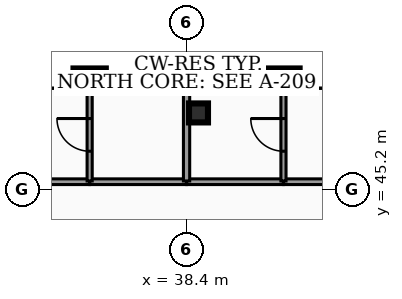
"""IFC4 building model, lengths in metres.
Left out: names, types, materials, properties, quantities, classifications, styles, units other than length and angle.
Written with IfcOpenShell. Run it as: python <this file> out.ifc"""

import sys

from ifc_helpers import new_model, si_unit, direction, frame, frame_2d, origin, origin_2d, place, context, subcontext, project, spatial, rectangle, hollow_rectangle, extrude, element, fill, save


model = new_model("IFC4")
c1 = context("Model", 3, precision=1e-05, world=origin(), true_north=direction((0.0, 1.0)))
c2 = subcontext(c1, "Body", "Model", "MODEL_VIEW")
j1 = project(units=[si_unit("LENGTHUNIT", "METRE"), si_unit("PLANEANGLEUNIT", "RADIAN")], contexts=[c1])
p1 = place(None, origin())
s1 = spatial("IfcSite", under=j1, at=p1, CompositionType="ELEMENT")
p2 = place(p1, origin())
s2 = spatial("IfcBuilding", under=s1, at=p2, CompositionType="ELEMENT")
p3 = place(p2, frame((0.0, 0.0, 258.4)))
s3 = spatial("IfcBuildingStorey", under=s2, at=p3, CompositionType="ELEMENT", Elevation=258.4)
p4 = place(p3, frame((38.714, 47.217, 0.0), z_axis=(0.0, 0.0, 1.0), x_axis=(1.0, 0.0, 0.0)))
e1 = element("IfcColumn", 1, at=p4, inside=s3, PredefinedType="COLUMN", context=c2, shape_type="SweptSolid", body=[
    extrude(hollow_rectangle(XDim=0.5, YDim=0.5, WallThickness=0.025, at=origin_2d()), origin(), (0.0, 0.0, 1.0), 3.18),
])
p5 = place(p3, frame((26.57, 45.407, 0.0), z_axis=(0.0, 0.0, 1.0), x_axis=(1.0, 0.0, 0.0)))
e2 = element("IfcWall", 2, at=p5, inside=s3, PredefinedType="PARTITIONING", context=c2, shape_type="SweptSolid", body=[
    extrude(rectangle(XDim=9.275, YDim=0.15, at=frame_2d((4.637, 0.0))), origin(), (0.0, 0.0, 1.0), 2.235),
])
p6 = place(p3, frame((35.855, 45.407, 0.0), z_axis=(0.0, 0.0, 1.0), x_axis=(1.0, 0.0, 0.0)))
e3 = element("IfcWall", 3, at=p6, inside=s3, PredefinedType="PARTITIONING", context=c2, shape_type="SweptSolid", body=[
    extrude(rectangle(XDim=2.54, YDim=0.15, at=frame_2d((1.27, 0.0))), origin(), (0.0, 0.0, 1.0), 2.235),
])
p7 = place(p3, frame((40.955, 45.407, 0.0), z_axis=(0.0, 0.0, 1.0), x_axis=(1.0, 0.0, 0.0)))
e4 = element("IfcWall", 4, at=p7, inside=s3, PredefinedType="PARTITIONING", context=c2, shape_type="SweptSolid", body=[
    extrude(rectangle(XDim=9.375, YDim=0.15, at=frame_2d((4.688, 0.0))), origin(), (0.0, 0.0, 1.0), 2.235),
])
p8 = place(p3, frame((38.405, 45.407, 0.0), z_axis=(0.0, 0.0, 1.0), x_axis=(1.0, 0.0, 0.0)))
e5 = element("IfcWall", 5, at=p8, inside=s3, PredefinedType="PARTITIONING", context=c2, shape_type="SweptSolid", body=[
    extrude(rectangle(XDim=2.54, YDim=0.15, at=frame_2d((1.27, 0.0))), origin(), (0.0, 0.0, 1.0), 2.235),
])
p9 = place(p3, frame((35.85, 45.427, 0.0), z_axis=(0.0, 0.0, 1.0), x_axis=(0.0, 1.0, 0.0)))
e6 = element("IfcWall", 6, at=p9, inside=s3, PredefinedType="PARTITIONING", context=c2, shape_type="SweptSolid", body=[
    extrude(rectangle(XDim=2.425, YDim=0.135, at=frame_2d((1.212, 0.0))), origin(), (0.0, 0.0, 1.0), 2.235),
])
p10 = place(p9, frame((0.782, 0.0, 0.0)))
e7 = element("IfcOpeningElement", 7, at=p10, cuts=e6, PredefinedType="OPENING", context=c2, shape_type="SweptSolid", body=[
    extrude(rectangle(XDim=0.86, YDim=2.05, at=frame_2d((0.43, 1.025))), frame((0.0, 0.077, 0.0), z_axis=(0.0, -1.0, 0.0), x_axis=(1.0, 0.0, 0.0)), (0.0, 0.0, 1.0), 0.155),
])
p11 = place(p3, frame((38.4, 45.427, 0.0), z_axis=(0.0, 0.0, 1.0), x_axis=(0.0, 1.0, 0.0)))
e8 = element("IfcWall", 8, at=p11, inside=s3, PredefinedType="PARTITIONING", context=c2, shape_type="SweptSolid", body=[
    extrude(rectangle(XDim=2.425, YDim=0.165, at=frame_2d((1.212, 0.0))), origin(), (0.0, 0.0, 1.0), 2.235),
])
p12 = place(p3, frame((40.95, 45.427, 0.0), z_axis=(0.0, 0.0, 1.0), x_axis=(0.0, 1.0, 0.0)))
e9 = element("IfcWall", 9, at=p12, inside=s3, PredefinedType="PARTITIONING", context=c2, shape_type="SweptSolid", body=[
    extrude(rectangle(XDim=2.425, YDim=0.135, at=frame_2d((1.212, 0.0))), origin(), (0.0, 0.0, 1.0), 2.235),
])
p13 = place(p12, frame((0.782, 0.0, 0.0)))
e10 = element("IfcOpeningElement", 10, at=p13, cuts=e9, PredefinedType="OPENING", context=c2, shape_type="SweptSolid", body=[
    extrude(rectangle(XDim=0.86, YDim=2.05, at=frame_2d((0.43, 1.025))), frame((0.0, 0.077, 0.0), z_axis=(0.0, -1.0, 0.0), x_axis=(1.0, 0.0, 0.0)), (0.0, 0.0, 1.0), 0.155),
])
p14 = place(p10, origin())
e11 = element("IfcDoor", 11, at=p14, inside=s3, OperationType="SINGLE_SWING_RIGHT", PredefinedType="DOOR", context=c2, shape_type="SweptSolid", body=[
    extrude(rectangle(XDim=0.86, YDim=2.05, at=frame_2d((0.43, 1.025))), frame((0.0, 0.025, 0.0), z_axis=(0.0, -1.0, 0.0), x_axis=(1.0, 0.0, 0.0)), (0.0, 0.0, 1.0), 0.05),
])
fill(e7, e11)
p15 = place(p13, origin())
e12 = element("IfcDoor", 12, at=p15, inside=s3, OperationType="SINGLE_SWING_RIGHT", PredefinedType="DOOR", context=c2, shape_type="SweptSolid", body=[
    extrude(rectangle(XDim=0.86, YDim=2.05, at=frame_2d((0.43, 1.025))), frame((0.0, 0.025, 0.0), z_axis=(0.0, -1.0, 0.0), x_axis=(1.0, 0.0, 0.0)), (0.0, 0.0, 1.0), 0.05),
])
fill(e10, e12)
save(model, sys.argv[1])
